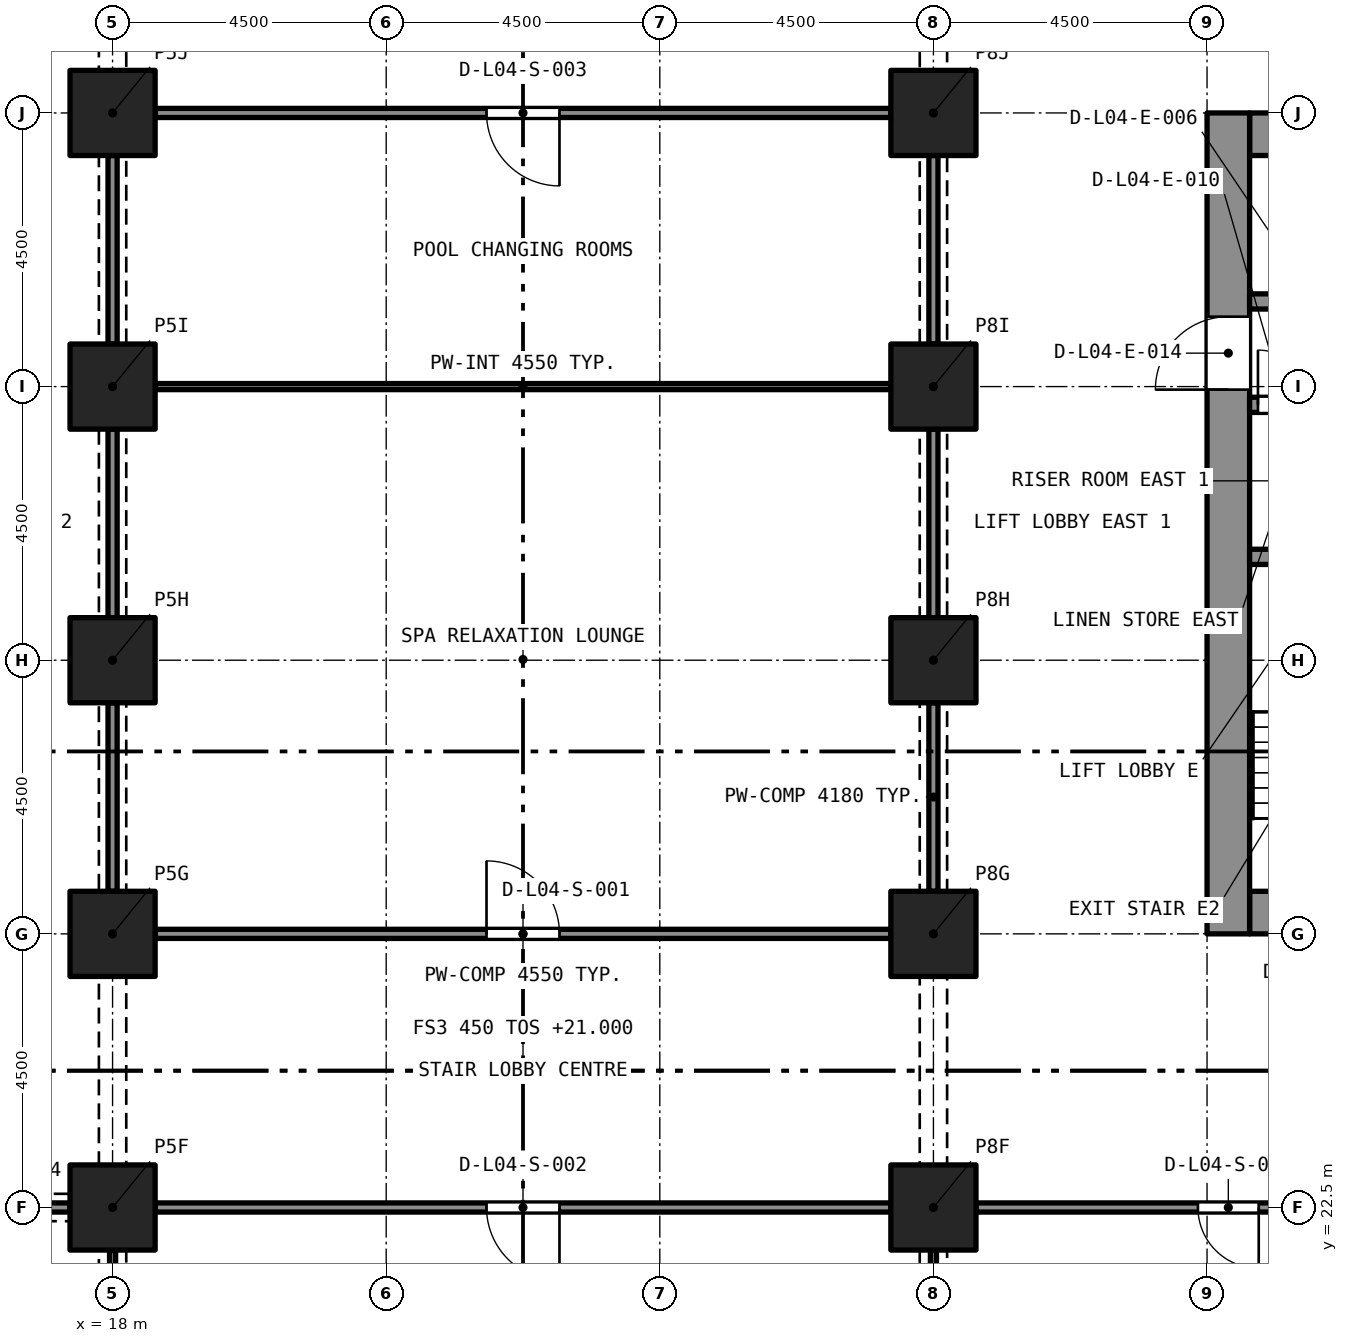
"""IFC4 building model, lengths in metres.
Left out: names, types, materials, properties, quantities, classifications, styles, units other than length and angle.
Written with IfcOpenShell. Run it as: python <this file> out.ifc"""

import sys

from ifc_helpers import new_model, si_unit, direction, frame, frame_2d, origin, origin_2d, place, context, subcontext, project, spatial, rectangle, extrude, element, fill, save


model = new_model("IFC4")
c1 = context("Model", 3, precision=1e-05, world=origin(), true_north=direction((0.0, 1.0)))
c2 = subcontext(c1, "Body", "Model", "MODEL_VIEW")
j1 = project(units=[si_unit("LENGTHUNIT", "METRE"), si_unit("PLANEANGLEUNIT", "RADIAN")], contexts=[c1])
p1 = place(None, origin())
s1 = spatial("IfcSite", under=j1, at=p1, CompositionType="ELEMENT")
p2 = place(p1, origin())
s2 = spatial("IfcBuilding", under=s1, at=p2, CompositionType="ELEMENT")
p3 = place(p2, frame((0.0, 0.0, 21.0)))
s3 = spatial("IfcBuildingStorey", under=s2, at=p3, CompositionType="ELEMENT", Elevation=21.0)
for number, where, z_axis, x_axis in (
    (1, (18.0, 22.5, 0.0), (0.0, 0.0, 1.0), (1.0, 0.0, 0.0)),
    (2, (31.5, 22.5, 0.0), (0.0, 0.0, 1.0), (1.0, 0.0, 0.0)),
    (3, (18.0, 27.0, 0.0), (0.0, 0.0, 1.0), (1.0, 0.0, 0.0)),
    (4, (31.5, 27.0, 0.0), (0.0, 0.0, 1.0), (1.0, 0.0, 0.0)),
    (5, (18.0, 31.5, 0.0), (0.0, 0.0, 1.0), (1.0, 0.0, 0.0)),
    (6, (31.5, 31.5, 0.0), (0.0, 0.0, 1.0), (1.0, 0.0, 0.0)),
    (7, (18.0, 36.0, 0.0), (0.0, 0.0, 1.0), (1.0, 0.0, 0.0)),
    (8, (31.5, 36.0, 0.0), (0.0, 0.0, 1.0), (1.0, 0.0, 0.0)),
    (9, (18.0, 40.5, 0.0), (0.0, 0.0, 1.0), (1.0, 0.0, 0.0)),
    (10, (31.5, 40.5, 0.0), (0.0, 0.0, 1.0), (1.0, 0.0, 0.0)),
):
    element("IfcColumn", number, at=place(p3, frame(where, z_axis=z_axis, x_axis=x_axis)), inside=s3, PredefinedType="COLUMN", context=c2, shape_type="SweptSolid", body=[
        extrude(rectangle(XDim=1.4, YDim=1.4, at=origin_2d()), origin(), (0.0, 0.0, 1.0), 5.0),
    ])
p4 = place(p3, frame((36.7, 27.35, 0.0), z_axis=(0.0, 0.0, 1.0), x_axis=(1.0, 0.0, 0.0)))
e11 = element("IfcWall", 11, at=p4, inside=s3, PredefinedType="SOLIDWALL", context=c2, shape_type="SweptSolid", body=[
    extrude(rectangle(XDim=7.6, YDim=0.7, at=frame_2d((3.8, 0.0))), origin(), (0.0, 0.0, 1.0), 5.0),
])
p5 = place(p4, frame((5.775, 0.0, 0.0)))
e12 = element("IfcOpeningElement", 12, at=p5, cuts=e11, PredefinedType="OPENING", context=c2, shape_type="SweptSolid", body=[
    extrude(rectangle(XDim=1.1, YDim=2.1, at=frame_2d((0.55, 1.05))), frame((0.0, 0.36, 0.0), z_axis=(0.0, -1.0, 0.0), x_axis=(1.0, 0.0, 0.0)), (0.0, 0.0, 1.0), 0.72),
])
p6 = place(p4, frame((3.25, 0.0, 0.0)))
e13 = element("IfcOpeningElement", 13, at=p6, cuts=e11, PredefinedType="OPENING", context=c2, shape_type="SweptSolid", body=[
    extrude(rectangle(XDim=1.1, YDim=2.1, at=frame_2d((0.55, 1.05))), frame((0.0, 0.36, 0.0), z_axis=(0.0, -1.0, 0.0), x_axis=(1.0, 0.0, 0.0)), (0.0, 0.0, 1.0), 0.72),
])
p7 = place(p4, frame((0.725, 0.0, 0.0)))
e14 = element("IfcOpeningElement", 14, at=p7, cuts=e11, PredefinedType="OPENING", context=c2, shape_type="SweptSolid", body=[
    extrude(rectangle(XDim=1.1, YDim=2.1, at=frame_2d((0.55, 1.05))), frame((0.0, 0.36, 0.0), z_axis=(0.0, -1.0, 0.0), x_axis=(1.0, 0.0, 0.0)), (0.0, 0.0, 1.0), 0.72),
])
p8 = place(p3, frame((36.7, 40.15, 0.0), z_axis=(0.0, 0.0, 1.0), x_axis=(1.0, 0.0, 0.0)))
e15 = element("IfcWall", 15, at=p8, inside=s3, PredefinedType="SOLIDWALL", context=c2, shape_type="SweptSolid", body=[
    extrude(rectangle(XDim=7.6, YDim=0.7, at=frame_2d((3.8, 0.0))), origin(), (0.0, 0.0, 1.0), 5.0),
])
p9 = place(p3, frame((36.35, 27.0, 0.0), z_axis=(0.0, 0.0, 1.0), x_axis=(0.0, 1.0, 0.0)))
e16 = element("IfcWall", 16, at=p9, inside=s3, PredefinedType="SOLIDWALL", context=c2, shape_type="SweptSolid", body=[
    extrude(rectangle(XDim=13.5, YDim=0.7, at=frame_2d((6.75, 0.0))), origin(), (0.0, 0.0, 1.0), 5.0),
])
p10 = place(p9, frame((8.95, 0.0, 0.0)))
e17 = element("IfcOpeningElement", 17, at=p10, cuts=e16, PredefinedType="OPENING", context=c2, shape_type="SweptSolid", body=[
    extrude(rectangle(XDim=1.2, YDim=2.1, at=frame_2d((0.6, 1.05))), frame((0.0, 0.36, 0.0), z_axis=(0.0, -1.0, 0.0), x_axis=(1.0, 0.0, 0.0)), (0.0, 0.0, 1.0), 0.72),
])
p11 = place(p3, frame((36.7, 33.2, 0.0), z_axis=(0.0, 0.0, 1.0), x_axis=(1.0, 0.0, 0.0)))
e18 = element("IfcWall", 18, at=p11, inside=s3, PredefinedType="SOLIDWALL", context=c2, shape_type="SweptSolid", body=[
    extrude(rectangle(XDim=7.6, YDim=0.25, at=frame_2d((3.8, 0.0))), origin(), (0.0, 0.0, 1.0), 4.65),
])
p12 = place(p11, frame((3.3, 0.0, 0.0)))
e19 = element("IfcOpeningElement", 19, at=p12, cuts=e18, PredefinedType="OPENING", context=c2, shape_type="SweptSolid", body=[
    extrude(rectangle(XDim=1.0, YDim=2.1, at=frame_2d((0.5, 1.05))), frame((0.0, 0.135, 0.0), z_axis=(0.0, -1.0, 0.0), x_axis=(1.0, 0.0, 0.0)), (0.0, 0.0, 1.0), 0.27),
])
p13 = place(p3, frame((36.7, 35.7, 0.0), z_axis=(0.0, 0.0, 1.0), x_axis=(1.0, 0.0, 0.0)))
e20 = element("IfcWall", 20, at=p13, inside=s3, PredefinedType="SOLIDWALL", context=c2, shape_type="SweptSolid", body=[
    extrude(rectangle(XDim=7.6, YDim=0.25, at=frame_2d((3.8, 0.0))), origin(), (0.0, 0.0, 1.0), 4.65),
])
p14 = place(p13, frame((6.725, 0.0, 0.0)))
e21 = element("IfcOpeningElement", 21, at=p14, cuts=e20, PredefinedType="OPENING", context=c2, shape_type="SweptSolid", body=[
    extrude(rectangle(XDim=0.8, YDim=2.1, at=frame_2d((0.4, 1.05))), frame((0.0, 0.135, 0.0), z_axis=(0.0, -1.0, 0.0), x_axis=(1.0, 0.0, 0.0)), (0.0, 0.0, 1.0), 0.27),
])
p15 = place(p13, frame((5.3, 0.0, 0.0)))
e22 = element("IfcOpeningElement", 22, at=p15, cuts=e20, PredefinedType="OPENING", context=c2, shape_type="SweptSolid", body=[
    extrude(rectangle(XDim=0.9, YDim=2.1, at=frame_2d((0.45, 1.05))), frame((0.0, 0.135, 0.0), z_axis=(0.0, -1.0, 0.0), x_axis=(1.0, 0.0, 0.0)), (0.0, 0.0, 1.0), 0.27),
])
p16 = place(p13, frame((1.512, 0.0, 0.0)))
e23 = element("IfcOpeningElement", 23, at=p16, cuts=e20, PredefinedType="OPENING", context=c2, shape_type="SweptSolid", body=[
    extrude(rectangle(XDim=0.9, YDim=2.1, at=frame_2d((0.45, 1.05))), frame((0.0, 0.135, 0.0), z_axis=(0.0, -1.0, 0.0), x_axis=(1.0, 0.0, 0.0)), (0.0, 0.0, 1.0), 0.27),
])
p17 = place(p13, frame((0.137, 0.0, 0.0)))
e24 = element("IfcOpeningElement", 24, at=p17, cuts=e20, PredefinedType="OPENING", context=c2, shape_type="SweptSolid", body=[
    extrude(rectangle(XDim=0.9, YDim=2.1, at=frame_2d((0.45, 1.05))), frame((0.0, 0.135, 0.0), z_axis=(0.0, -1.0, 0.0), x_axis=(1.0, 0.0, 0.0)), (0.0, 0.0, 1.0), 0.27),
])
p18 = place(p3, frame((36.7, 37.4, 0.0), z_axis=(0.0, 0.0, 1.0), x_axis=(1.0, 0.0, 0.0)))
e25 = element("IfcWall", 25, at=p18, inside=s3, PredefinedType="SOLIDWALL", context=c2, shape_type="SweptSolid", body=[
    extrude(rectangle(XDim=7.6, YDim=0.25, at=frame_2d((3.8, 0.0))), origin(), (0.0, 0.0, 1.0), 4.65),
])
p19 = place(p18, frame((5.8, 0.0, 0.0)))
e26 = element("IfcOpeningElement", 26, at=p19, cuts=e25, PredefinedType="OPENING", context=c2, shape_type="SweptSolid", body=[
    extrude(rectangle(XDim=1.1, YDim=2.4, at=frame_2d((0.55, 1.2))), frame((0.0, 0.135, 0.0), z_axis=(0.0, -1.0, 0.0), x_axis=(1.0, 0.0, 0.0)), (0.0, 0.0, 1.0), 0.27),
])
p20 = place(p18, frame((3.1, 0.0, 0.0)))
e27 = element("IfcOpeningElement", 27, at=p20, cuts=e25, PredefinedType="OPENING", context=c2, shape_type="SweptSolid", body=[
    extrude(rectangle(XDim=1.1, YDim=2.4, at=frame_2d((0.55, 1.2))), frame((0.0, 0.135, 0.0), z_axis=(0.0, -1.0, 0.0), x_axis=(1.0, 0.0, 0.0)), (0.0, 0.0, 1.0), 0.27),
])
p21 = place(p18, frame((0.75, 0.0, 0.0)))
e28 = element("IfcOpeningElement", 28, at=p21, cuts=e25, PredefinedType="OPENING", context=c2, shape_type="SweptSolid", body=[
    extrude(rectangle(XDim=0.7, YDim=2.1, at=frame_2d((0.35, 1.05))), frame((0.0, 0.135, 0.0), z_axis=(0.0, -1.0, 0.0), x_axis=(1.0, 0.0, 0.0)), (0.0, 0.0, 1.0), 0.27),
])
p22 = place(p3, frame((18.7, 27.0, 0.0), z_axis=(0.0, 0.0, 1.0), x_axis=(1.0, 0.0, 0.0)))
e29 = element("IfcWall", 29, at=p22, inside=s3, PredefinedType="PARTITIONING", context=c2, shape_type="SweptSolid", body=[
    extrude(rectangle(XDim=12.1, YDim=0.15, at=frame_2d((6.05, 0.0))), origin(), (0.0, 0.0, 1.0), 4.55),
])
p23 = place(p22, frame((5.45, 0.0, 0.0)))
e30 = element("IfcOpeningElement", 30, at=p23, cuts=e29, PredefinedType="OPENING", context=c2, shape_type="SweptSolid", body=[
    extrude(rectangle(XDim=1.2, YDim=2.1, at=frame_2d((0.6, 1.05))), frame((0.0, 0.085, 0.0), z_axis=(0.0, -1.0, 0.0), x_axis=(1.0, 0.0, 0.0)), (0.0, 0.0, 1.0), 0.17),
])
p24 = place(p3, frame((30.8, 22.5, 0.0), z_axis=(0.0, 0.0, 1.0), x_axis=(-1.0, 0.0, 0.0)))
e31 = element("IfcWall", 31, at=p24, inside=s3, PredefinedType="PARTITIONING", context=c2, shape_type="SweptSolid", body=[
    extrude(rectangle(XDim=12.1, YDim=0.15, at=frame_2d((6.05, 0.0))), origin(), (0.0, 0.0, 1.0), 4.55),
])
p25 = place(p24, frame((5.45, 0.0, 0.0)))
e32 = element("IfcOpeningElement", 32, at=p25, cuts=e31, PredefinedType="OPENING", context=c2, shape_type="SweptSolid", body=[
    extrude(rectangle(XDim=1.2, YDim=2.1, at=frame_2d((0.6, 1.05))), frame((0.0, 0.085, 0.0), z_axis=(0.0, -1.0, 0.0), x_axis=(1.0, 0.0, 0.0)), (0.0, 0.0, 1.0), 0.17),
])
p26 = place(p3, frame((18.7, 36.0, 0.0), z_axis=(0.0, 0.0, 1.0), x_axis=(1.0, 0.0, 0.0)))
e33 = element("IfcWall", 33, at=p26, inside=s3, PredefinedType="PARTITIONING", context=c2, shape_type="SweptSolid", body=[
    extrude(rectangle(XDim=12.1, YDim=0.1, at=frame_2d((6.05, 0.0))), origin(), (0.0, 0.0, 1.0), 4.55),
])
for number, where, z_axis, x_axis in (
    (34, (31.5, 32.2, 0.0), (0.0, 0.0, 1.0), (0.0, 1.0, 0.0)),
    (35, (31.5, 27.7, 0.0), (0.0, 0.0, 1.0), (0.0, 1.0, 0.0)),
    (36, (18.0, 27.7, 0.0), (0.0, 0.0, 1.0), (0.0, 1.0, 0.0)),
    (37, (18.0, 32.2, 0.0), (0.0, 0.0, 1.0), (0.0, 1.0, 0.0)),
):
    element("IfcWall", number, at=place(p3, frame(where, z_axis=z_axis, x_axis=x_axis)), inside=s3, PredefinedType="PARTITIONING", context=c2, shape_type="SweptSolid", body=[
        extrude(rectangle(XDim=3.1, YDim=0.15, at=frame_2d((1.55, 0.0))), origin(), (0.0, 0.0, 1.0), 4.18),
    ])
p27 = place(p3, frame((30.8, 40.5, 0.0), z_axis=(0.0, 0.0, 1.0), x_axis=(-1.0, 0.0, 0.0)))
e38 = element("IfcWall", 38, at=p27, inside=s3, PredefinedType="PARTITIONING", context=c2, shape_type="SweptSolid", body=[
    extrude(rectangle(XDim=12.1, YDim=0.15, at=frame_2d((6.05, 0.0))), origin(), (0.0, 0.0, 1.0), 4.55),
])
p28 = place(p27, frame((5.45, 0.0, 0.0)))
e39 = element("IfcOpeningElement", 39, at=p28, cuts=e38, PredefinedType="OPENING", context=c2, shape_type="SweptSolid", body=[
    extrude(rectangle(XDim=1.2, YDim=2.1, at=frame_2d((0.6, 1.05))), frame((0.0, 0.085, 0.0), z_axis=(0.0, -1.0, 0.0), x_axis=(1.0, 0.0, 0.0)), (0.0, 0.0, 1.0), 0.17),
])
for number, where, z_axis, x_axis in (
    (40, (31.5, 36.7, 0.0), (0.0, 0.0, 1.0), (0.0, 1.0, 0.0)),
    (41, (18.0, 36.7, 0.0), (0.0, 0.0, 1.0), (0.0, 1.0, 0.0)),
):
    element("IfcWall", number, at=place(p3, frame(where, z_axis=z_axis, x_axis=x_axis)), inside=s3, PredefinedType="PARTITIONING", context=c2, shape_type="SweptSolid", body=[
        extrude(rectangle(XDim=3.1, YDim=0.15, at=frame_2d((1.55, 0.0))), origin(), (0.0, 0.0, 1.0), 4.18),
    ])
for number, where, z_axis, x_axis in (
    (42, (31.5, 18.7, 0.0), (0.0, 0.0, 1.0), (0.0, 1.0, 0.0)),
    (43, (18.0, 18.7, 0.0), (0.0, 0.0, 1.0), (0.0, 1.0, 0.0)),
):
    element("IfcWall", number, at=place(p3, frame(where, z_axis=z_axis, x_axis=x_axis)), inside=s3, PredefinedType="PARTITIONING", context=c2, shape_type="SweptSolid", body=[
        extrude(rectangle(XDim=3.1, YDim=0.1, at=frame_2d((1.55, 0.0))), origin(), (0.0, 0.0, 1.0), 4.18),
    ])
p29 = place(p3, frame((40.575, 22.5, 0.0), z_axis=(0.0, 0.0, 1.0), x_axis=(-1.0, 0.0, 0.0)))
e44 = element("IfcWall", 44, at=p29, inside=s3, PredefinedType="PARTITIONING", context=c2, shape_type="SweptSolid", body=[
    extrude(rectangle(XDim=8.375, YDim=0.15, at=frame_2d((4.188, 0.0))), origin(), (0.0, 0.0, 1.0), 4.65),
])
p30 = place(p29, frame((3.725, 0.0, 0.0)))
e45 = element("IfcOpeningElement", 45, at=p30, cuts=e44, PredefinedType="OPENING", context=c2, shape_type="SweptSolid", body=[
    extrude(rectangle(XDim=1.0, YDim=2.1, at=frame_2d((0.5, 1.05))), frame((0.0, 0.085, 0.0), z_axis=(0.0, -1.0, 0.0), x_axis=(1.0, 0.0, 0.0)), (0.0, 0.0, 1.0), 0.17),
])
p31 = place(p3, frame((17.3, 22.5, 0.0), z_axis=(0.0, 0.0, 1.0), x_axis=(-1.0, 0.0, 0.0)))
e46 = element("IfcWall", 46, at=p31, inside=s3, PredefinedType="PARTITIONING", context=c2, shape_type="SweptSolid", body=[
    extrude(rectangle(XDim=3.1, YDim=0.15, at=frame_2d((1.55, 0.0))), origin(), (0.0, 0.0, 1.0), 4.18),
])
p32 = place(p31, frame((1.05, 0.0, 0.0)))
e47 = element("IfcOpeningElement", 47, at=p32, cuts=e46, PredefinedType="OPENING", context=c2, shape_type="SweptSolid", body=[
    extrude(rectangle(XDim=1.0, YDim=2.1, at=frame_2d((0.5, 1.05))), frame((0.0, 0.085, 0.0), z_axis=(0.0, -1.0, 0.0), x_axis=(1.0, 0.0, 0.0)), (0.0, 0.0, 1.0), 0.17),
])
p33 = place(p17, origin())
e48 = element("IfcDoor", 48, at=p33, inside=s3, OperationType="SINGLE_SWING_LEFT", PredefinedType="DOOR", context=c2, shape_type="SweptSolid", body=[
    extrude(rectangle(XDim=0.9, YDim=2.1, at=frame_2d((0.45, 1.05))), frame((0.0, 0.025, 0.0), z_axis=(0.0, -1.0, 0.0), x_axis=(1.0, 0.0, 0.0)), (0.0, 0.0, 1.0), 0.05),
])
fill(e24, e48)
p34 = place(p10, origin())
e49 = element("IfcDoor", 49, at=p34, inside=s3, OperationType="SINGLE_SWING_LEFT", PredefinedType="DOOR", context=c2, shape_type="SweptSolid", body=[
    extrude(rectangle(XDim=1.2, YDim=2.1, at=frame_2d((0.6, 1.05))), frame((0.0, 0.025, 0.0), z_axis=(0.0, -1.0, 0.0), x_axis=(1.0, 0.0, 0.0)), (0.0, 0.0, 1.0), 0.05),
])
fill(e17, e49)
p35 = place(p23, origin())
e50 = element("IfcDoor", 50, at=p35, inside=s3, OperationType="SINGLE_SWING_RIGHT", PredefinedType="DOOR", context=c2, shape_type="SweptSolid", body=[
    extrude(rectangle(XDim=1.2, YDim=2.1, at=frame_2d((0.6, 1.05))), frame((0.0, 0.025, 0.0), z_axis=(0.0, -1.0, 0.0), x_axis=(1.0, 0.0, 0.0)), (0.0, 0.0, 1.0), 0.05),
])
fill(e30, e50)
p36 = place(p25, origin())
e51 = element("IfcDoor", 51, at=p36, inside=s3, OperationType="SINGLE_SWING_RIGHT", PredefinedType="DOOR", context=c2, shape_type="SweptSolid", body=[
    extrude(rectangle(XDim=1.2, YDim=2.1, at=frame_2d((0.6, 1.05))), frame((0.0, 0.025, 0.0), z_axis=(0.0, -1.0, 0.0), x_axis=(1.0, 0.0, 0.0)), (0.0, 0.0, 1.0), 0.05),
])
fill(e32, e51)
p37 = place(p28, origin())
e52 = element("IfcDoor", 52, at=p37, inside=s3, OperationType="SINGLE_SWING_RIGHT", PredefinedType="DOOR", context=c2, shape_type="SweptSolid", body=[
    extrude(rectangle(XDim=1.2, YDim=2.1, at=frame_2d((0.6, 1.05))), frame((0.0, 0.025, 0.0), z_axis=(0.0, -1.0, 0.0), x_axis=(1.0, 0.0, 0.0)), (0.0, 0.0, 1.0), 0.05),
])
fill(e39, e52)
p38 = place(p30, origin())
e53 = element("IfcDoor", 53, at=p38, inside=s3, OperationType="SINGLE_SWING_RIGHT", PredefinedType="DOOR", context=c2, shape_type="SweptSolid", body=[
    extrude(rectangle(XDim=1.0, YDim=2.1, at=frame_2d((0.5, 1.05))), frame((0.0, 0.025, 0.0), z_axis=(0.0, -1.0, 0.0), x_axis=(1.0, 0.0, 0.0)), (0.0, 0.0, 1.0), 0.05),
])
fill(e45, e53)
save(model, sys.argv[1])
